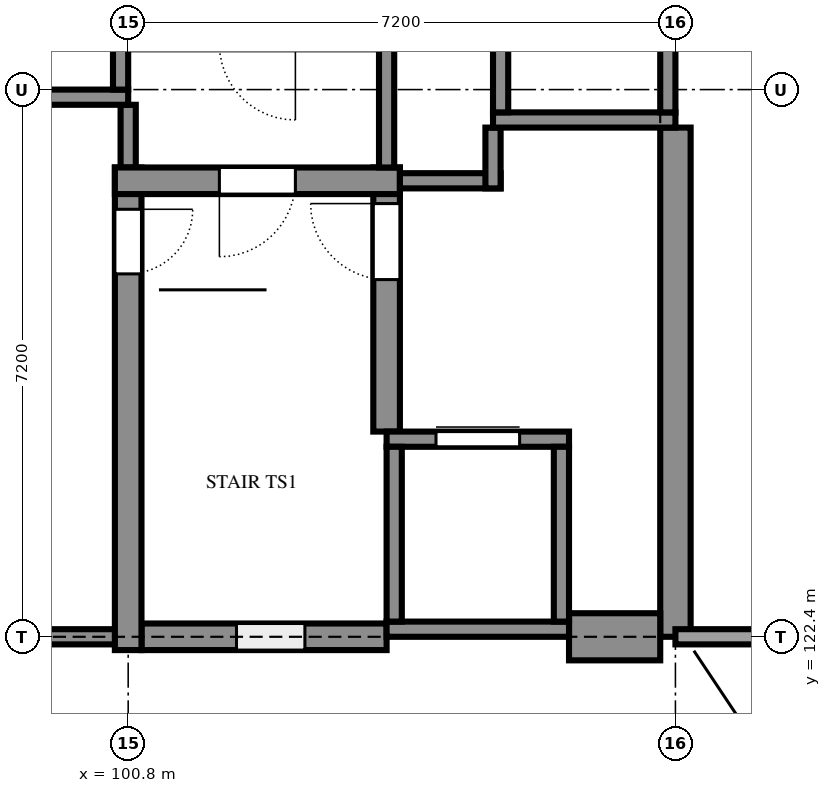
"""IFC4 building model, lengths in metres.
Left out: names, types, materials, properties, quantities, classifications, styles, units other than length and angle.
Written with IfcOpenShell. Run it as: python <this file> out.ifc"""

import sys

from ifc_helpers import new_model, si_unit, direction, frame, frame_2d, origin, place, context, subcontext, project, spatial, rectangle, extrude, element, fill, save


model = new_model("IFC4")
c1 = context("Model", 3, precision=1e-05, world=origin(), true_north=direction((0.0, 1.0)))
c2 = subcontext(c1, "Body", "Model", "MODEL_VIEW")
j1 = project(units=[si_unit("LENGTHUNIT", "METRE"), si_unit("PLANEANGLEUNIT", "RADIAN")], contexts=[c1])
p1 = place(None, origin())
s1 = spatial("IfcSite", under=j1, at=p1, CompositionType="ELEMENT")
p2 = place(p1, origin())
s2 = spatial("IfcBuilding", under=s1, at=p2, CompositionType="ELEMENT")
p3 = place(p2, frame((0.0, 0.0, 25.2)))
s3 = spatial("IfcBuildingStorey", under=s2, at=p3, CompositionType="ELEMENT", Elevation=25.2)
p4 = place(p3, frame((93.4, 122.4, 0.0), z_axis=(0.0, 0.0, 1.0), x_axis=(1.0, 0.0, 0.0)))
e1 = element("IfcWall", 1, at=p4, inside=s3, PredefinedType="SHEAR", context=c2, shape_type="SweptSolid", body=[
    extrude(rectangle(XDim=7.575, YDim=0.2, at=frame_2d((3.788, 0.0))), origin(), (0.0, 0.0, 1.0), 3.6),
])
p5 = place(p3, frame((100.975, 122.4, 0.0), z_axis=(0.0, 0.0, 1.0), x_axis=(1.0, 0.0, 0.0)))
e2 = element("IfcWall", 2, at=p5, inside=s3, PredefinedType="SHEAR", context=c2, shape_type="SweptSolid", body=[
    extrude(rectangle(XDim=3.225, YDim=0.35, at=frame_2d((1.612, 0.0))), origin(), (0.0, 0.0, 1.0), 3.6),
])
p6 = place(p5, frame((1.25, 0.0, 0.6)))
e3 = element("IfcOpeningElement", 3, at=p6, cuts=e2, PredefinedType="OPENING", context=c2, shape_type="SweptSolid", body=[
    extrude(rectangle(XDim=0.9, YDim=2.1, at=frame_2d((0.45, 1.05))), frame((0.0, 0.185, 0.0), z_axis=(0.0, -1.0, 0.0), x_axis=(1.0, 0.0, 0.0)), (0.0, 0.0, 1.0), 0.37),
])
p7 = place(p3, frame((108.0, 122.4, 0.0), z_axis=(0.0, 0.0, 1.0), x_axis=(0.0, 1.0, 0.0)))
e4 = element("IfcWall", 4, at=p7, inside=s3, PredefinedType="SHEAR", context=c2, shape_type="SweptSolid", body=[
    extrude(rectangle(XDim=6.7, YDim=0.4, at=frame_2d((3.35, 0.0))), origin(), (0.0, 0.0, 1.0), 3.6),
])
p8 = place(p3, frame((104.2, 125.1, 0.0), z_axis=(0.0, 0.0, 1.0), x_axis=(0.0, 1.0, 0.0)))
e5 = element("IfcWall", 5, at=p8, inside=s3, PredefinedType="SHEAR", context=c2, shape_type="SweptSolid", body=[
    extrude(rectangle(XDim=3.475, YDim=0.35, at=frame_2d((1.737, 0.0))), origin(), (0.0, 0.0, 1.0), 3.6),
])
p9 = place(p8, frame((2.0, 0.0, 0.0)))
e6 = element("IfcOpeningElement", 6, at=p9, cuts=e5, PredefinedType="OPENING", context=c2, shape_type="SweptSolid", body=[
    extrude(rectangle(XDim=1.0, YDim=2.1, at=frame_2d((0.5, 1.05))), frame((0.0, 0.185, 0.0), z_axis=(0.0, -1.0, 0.0), x_axis=(1.0, 0.0, 0.0)), (0.0, 0.0, 1.0), 0.37),
])
p10 = place(p3, frame((100.8, 128.575, 0.0), z_axis=(0.0, 0.0, 1.0), x_axis=(0.0, -1.0, 0.0)))
e7 = element("IfcWall", 7, at=p10, inside=s3, PredefinedType="SHEAR", context=c2, shape_type="SweptSolid", body=[
    extrude(rectangle(XDim=6.35, YDim=0.35, at=frame_2d((3.175, 0.0))), origin(), (0.0, 0.0, 1.0), 3.6),
])
p11 = place(p10, frame((0.55, 0.0, 0.0)))
e8 = element("IfcOpeningElement", 8, at=p11, cuts=e7, PredefinedType="OPENING", context=c2, shape_type="SweptSolid", body=[
    extrude(rectangle(XDim=0.85, YDim=2.1, at=frame_2d((0.425, 1.05))), frame((0.0, 0.185, 0.0), z_axis=(0.0, -1.0, 0.0), x_axis=(1.0, 0.0, 0.0)), (0.0, 0.0, 1.0), 0.37),
])
p12 = place(p3, frame((100.8, 128.575, 0.0), z_axis=(0.0, 0.0, 1.0), x_axis=(0.0, 1.0, 0.0)))
e9 = element("IfcWall", 9, at=p12, inside=s3, PredefinedType="SHEAR", context=c2, shape_type="SweptSolid", body=[
    extrude(rectangle(XDim=0.825, YDim=0.2, at=frame_2d((0.413, 0.0))), origin(), (0.0, 0.0, 1.0), 3.6),
])
p13 = place(p3, frame((104.375, 128.4, 0.0), z_axis=(0.0, 0.0, 1.0), x_axis=(-1.0, 0.0, 0.0)))
e10 = element("IfcWall", 10, at=p13, inside=s3, PredefinedType="SHEAR", context=c2, shape_type="SweptSolid", body=[
    extrude(rectangle(XDim=3.75, YDim=0.35, at=frame_2d((1.875, 0.0))), origin(), (0.0, 0.0, 1.0), 3.6),
])
p14 = place(p13, frame((1.375, 0.0, 0.0)))
e11 = element("IfcOpeningElement", 11, at=p14, cuts=e10, PredefinedType="OPENING", context=c2, shape_type="SweptSolid", body=[
    extrude(rectangle(XDim=1.0, YDim=2.1, at=frame_2d((0.5, 1.05))), frame((0.0, 0.185, 0.0), z_axis=(0.0, -1.0, 0.0), x_axis=(1.0, 0.0, 0.0)), (0.0, 0.0, 1.0), 0.37),
])
p15 = place(p3, frame((104.375, 128.4, 0.0), z_axis=(0.0, 0.0, 1.0), x_axis=(1.0, 0.0, 0.0)))
e12 = element("IfcWall", 12, at=p15, inside=s3, PredefinedType="SHEAR", context=c2, shape_type="SweptSolid", body=[
    extrude(rectangle(XDim=1.325, YDim=0.2, at=frame_2d((0.663, 0.0))), origin(), (0.0, 0.0, 1.0), 3.6),
])
p16 = place(p3, frame((105.6, 128.3, 0.0), z_axis=(0.0, 0.0, 1.0), x_axis=(0.0, 1.0, 0.0)))
e13 = element("IfcWall", 13, at=p16, inside=s3, PredefinedType="SHEAR", context=c2, shape_type="SweptSolid", body=[
    extrude(rectangle(XDim=0.8, YDim=0.2, at=frame_2d((0.4, 0.0))), origin(), (0.0, 0.0, 1.0), 3.6),
])
p17 = place(p3, frame((104.2, 132.1, 0.0), z_axis=(0.0, 0.0, 1.0), x_axis=(0.0, -1.0, 0.0)))
e14 = element("IfcWall", 14, at=p17, inside=s3, PredefinedType="SHEAR", context=c2, shape_type="SweptSolid", body=[
    extrude(rectangle(XDim=3.525, YDim=0.2, at=frame_2d((1.763, 0.0))), origin(), (0.0, 0.0, 1.0), 3.6),
])
p18 = place(p3, frame((106.6, 122.4, 0.0), z_axis=(0.0, 0.0, 1.0), x_axis=(1.0, 0.0, 0.0)))
e15 = element("IfcWall", 15, at=p18, inside=s3, PredefinedType="SOLIDWALL", context=c2, shape_type="SweptSolid", body=[
    extrude(rectangle(XDim=1.2, YDim=0.62, at=frame_2d((0.6, 0.0))), origin(), (0.0, 0.0, 1.0), 3.29),
])
p19 = place(p3, frame((98.4, 129.5, 0.0), z_axis=(0.0, 0.0, 1.0), x_axis=(1.0, 0.0, 0.0)))
e16 = element("IfcWall", 16, at=p19, inside=s3, PredefinedType="SHEAR", context=c2, shape_type="SweptSolid", body=[
    extrude(rectangle(XDim=2.4, YDim=0.2, at=frame_2d((1.2, 0.0))), origin(), (0.0, 0.0, 1.0), 4.5),
])
p20 = place(p3, frame((100.7, 129.6, 0.0), z_axis=(0.0, 0.0, 1.0), x_axis=(0.0, 1.0, 0.0)))
e17 = element("IfcWall", 17, at=p20, inside=s3, PredefinedType="SHEAR", context=c2, shape_type="SweptSolid", body=[
    extrude(rectangle(XDim=2.2, YDim=0.2, at=frame_2d((1.1, 0.0))), origin(), (0.0, 0.0, 1.0), 4.5),
])
p21 = place(p3, frame((104.2, 122.5, 0.0), z_axis=(0.0, 0.0, 1.0), x_axis=(1.0, 0.0, 0.0)))
e18 = element("IfcWall", 18, at=p21, inside=s3, PredefinedType="SHEAR", context=c2, shape_type="SweptSolid", body=[
    extrude(rectangle(XDim=2.4, YDim=0.2, at=frame_2d((1.2, 0.0))), origin(), (0.0, 0.0, 1.0), 4.5),
])
p22 = place(p3, frame((104.2, 125.0, 0.0), z_axis=(0.0, 0.0, 1.0), x_axis=(1.0, 0.0, 0.0)))
e19 = element("IfcWall", 19, at=p22, inside=s3, PredefinedType="SHEAR", context=c2, shape_type="SweptSolid", body=[
    extrude(rectangle(XDim=2.4, YDim=0.2, at=frame_2d((1.2, 0.0))), origin(), (0.0, 0.0, 1.0), 4.5),
])
p23 = place(p22, frame((0.65, 0.0, 0.0)))
e20 = element("IfcOpeningElement", 20, at=p23, cuts=e19, PredefinedType="OPENING", context=c2, shape_type="SweptSolid", body=[
    extrude(rectangle(XDim=1.1, YDim=2.1, at=frame_2d((0.55, 1.05))), frame((0.0, 0.11, 0.0), z_axis=(0.0, -1.0, 0.0), x_axis=(1.0, 0.0, 0.0)), (0.0, 0.0, 1.0), 0.22),
])
for number, where, z_axis, x_axis in (
    (21, (104.3, 122.6, 0.0), (0.0, 0.0, 1.0), (0.0, 1.0, 0.0)),
    (22, (106.5, 122.6, 0.0), (0.0, 0.0, 1.0), (0.0, 1.0, 0.0)),
):
    element("IfcWall", number, at=place(p3, frame(where, z_axis=z_axis, x_axis=x_axis)), inside=s3, PredefinedType="SHEAR", context=c2, shape_type="SweptSolid", body=[
        extrude(rectangle(XDim=2.3, YDim=0.2, at=frame_2d((1.15, 0.0))), origin(), (0.0, 0.0, 1.0), 4.5),
    ])
p24 = place(p3, frame((105.6, 129.2, 0.0), z_axis=(0.0, 0.0, 1.0), x_axis=(1.0, 0.0, 0.0)))
e23 = element("IfcWall", 23, at=p24, inside=s3, PredefinedType="SHEAR", context=c2, shape_type="SweptSolid", body=[
    extrude(rectangle(XDim=2.4, YDim=0.2, at=frame_2d((1.2, 0.0))), origin(), (0.0, 0.0, 1.0), 4.5),
])
for number, where, z_axis, x_axis in (
    (24, (105.7, 129.3, 0.0), (0.0, 0.0, 1.0), (0.0, 1.0, 0.0)),
    (25, (107.9, 129.3, 0.0), (0.0, 0.0, 1.0), (0.0, 1.0, 0.0)),
):
    element("IfcWall", number, at=place(p3, frame(where, z_axis=z_axis, x_axis=x_axis)), inside=s3, PredefinedType="SHEAR", context=c2, shape_type="SweptSolid", body=[
        extrude(rectangle(XDim=2.5, YDim=0.2, at=frame_2d((1.25, 0.0))), origin(), (0.0, 0.0, 1.0), 4.5),
    ])
p25 = place(p6, origin())
e26 = element("IfcWindow", 26, at=p25, inside=s3, PartitioningType="SINGLE_PANEL", PredefinedType="WINDOW", context=c2, shape_type="SweptSolid", body=[
    extrude(rectangle(XDim=0.9, YDim=2.1, at=frame_2d((0.45, 1.05))), frame((0.0, 0.03, 0.0), z_axis=(0.0, -1.0, 0.0), x_axis=(1.0, 0.0, 0.0)), (0.0, 0.0, 1.0), 0.06),
])
fill(e3, e26)
p26 = place(p23, origin())
e27 = element("IfcDoor", 27, at=p26, inside=s3, OperationType="SLIDING_TO_LEFT", PredefinedType="DOOR", context=c2, shape_type="SweptSolid", body=[
    extrude(rectangle(XDim=1.1, YDim=2.1, at=frame_2d((0.55, 1.05))), frame((0.0, 0.025, 0.0), z_axis=(0.0, -1.0, 0.0), x_axis=(1.0, 0.0, 0.0)), (0.0, 0.0, 1.0), 0.05),
])
fill(e20, e27)
p27 = place(p14, origin())
e28 = element("IfcDoor", 28, at=p27, inside=s3, OperationType="SINGLE_SWING_LEFT", PredefinedType="DOOR", context=c2, shape_type="SweptSolid", body=[
    extrude(rectangle(XDim=1.0, YDim=2.1, at=frame_2d((0.5, 1.05))), frame((0.0, 0.025, 0.0), z_axis=(0.0, -1.0, 0.0), x_axis=(1.0, 0.0, 0.0)), (0.0, 0.0, 1.0), 0.05),
])
fill(e11, e28)
p28 = place(p11, origin())
e29 = element("IfcDoor", 29, at=p28, inside=s3, OperationType="SINGLE_SWING_RIGHT", PredefinedType="DOOR", context=c2, shape_type="SweptSolid", body=[
    extrude(rectangle(XDim=0.85, YDim=2.1, at=frame_2d((0.425, 1.05))), frame((0.0, 0.025, 0.0), z_axis=(0.0, -1.0, 0.0), x_axis=(1.0, 0.0, 0.0)), (0.0, 0.0, 1.0), 0.05),
])
fill(e8, e29)
p29 = place(p9, origin())
e30 = element("IfcDoor", 30, at=p29, inside=s3, OperationType="SINGLE_SWING_LEFT", PredefinedType="DOOR", context=c2, shape_type="SweptSolid", body=[
    extrude(rectangle(XDim=1.0, YDim=2.1, at=frame_2d((0.5, 1.05))), frame((0.0, 0.025, 0.0), z_axis=(0.0, -1.0, 0.0), x_axis=(1.0, 0.0, 0.0)), (0.0, 0.0, 1.0), 0.05),
])
fill(e6, e30)
save(model, sys.argv[1])
